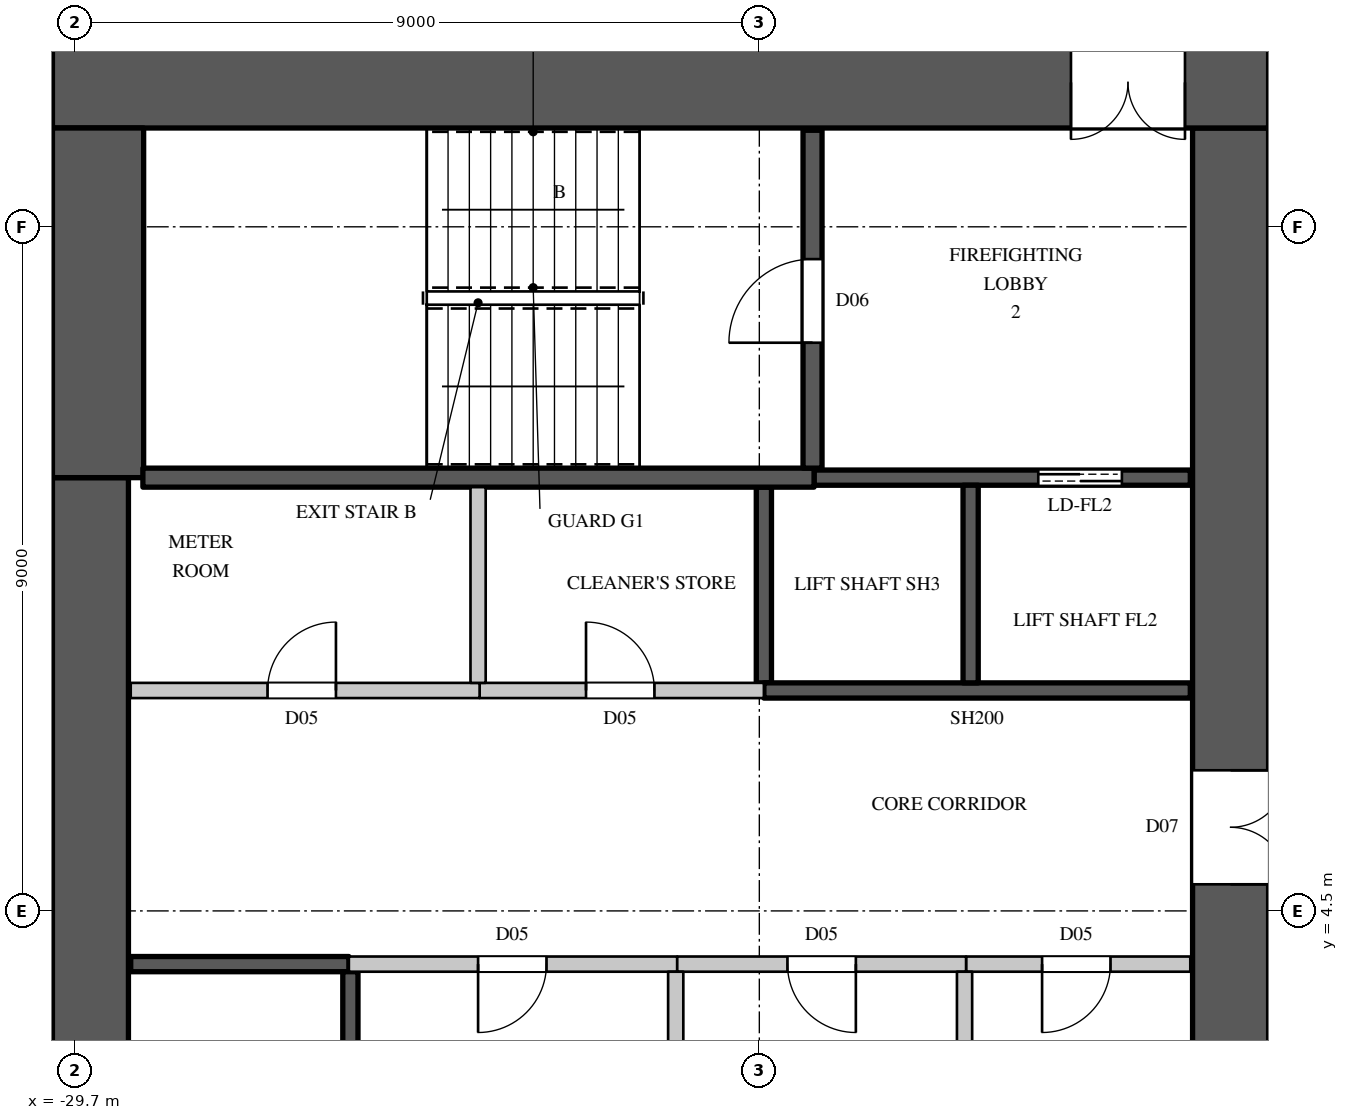
"""IFC4 building model, lengths in metres.
Left out: names, types, materials, properties, quantities, classifications, styles, units other than length and angle.
Written with IfcOpenShell. Run it as: python <this file> out.ifc"""

import sys

from ifc_helpers import new_model, si_unit, direction, frame, frame_2d, origin, place, context, subcontext, project, spatial, rectangle, extrude, element, fill, save


model = new_model("IFC4")
c1 = context("Model", 3, precision=1e-05, world=origin(), true_north=direction((0.0, 1.0)))
c2 = subcontext(c1, "Body", "Model", "MODEL_VIEW")
j1 = project(units=[si_unit("LENGTHUNIT", "METRE"), si_unit("PLANEANGLEUNIT", "RADIAN")], contexts=[c1])
p1 = place(None, origin())
s1 = spatial("IfcSite", under=j1, at=p1, CompositionType="ELEMENT")
p2 = place(p1, origin())
s2 = spatial("IfcBuilding", under=s1, at=p2, CompositionType="ELEMENT")
p3 = place(p2, frame((0.0, 0.0, 87.9)))
s3 = spatial("IfcBuildingStorey", under=s2, at=p3, CompositionType="ELEMENT", Elevation=87.9)
p4 = place(p3, frame((-30.0, 15.4, 0.0), z_axis=(0.0, 0.0, 1.0), x_axis=(1.0, 0.0, 0.0)))
e1 = element("IfcWall", 1, at=p4, inside=s3, PredefinedType="SHEAR", context=c2, shape_type="SweptSolid", body=[
    extrude(rectangle(XDim=16.0, YDim=1.2, at=frame_2d((8.0, 0.0))), origin(), (0.0, 0.0, 1.0), 3.6),
])
p5 = place(p4, frame((13.4, 0.0, 0.0)))
e2 = element("IfcOpeningElement", 2, at=p5, cuts=e1, PredefinedType="OPENING", context=c2, shape_type="SweptSolid", body=[
    extrude(rectangle(XDim=1.5, YDim=2.4, at=frame_2d((0.75, 1.2))), frame((0.0, 0.61, 0.0), z_axis=(0.0, -1.0, 0.0), x_axis=(1.0, 0.0, 0.0)), (0.0, 0.0, 1.0), 1.22),
])
p6 = place(p3, frame((-14.5, -14.8, 0.0), z_axis=(0.0, 0.0, 1.0), x_axis=(0.0, 1.0, 0.0)))
e3 = element("IfcWall", 3, at=p6, inside=s3, PredefinedType="SHEAR", context=c2, shape_type="SweptSolid", body=[
    extrude(rectangle(XDim=29.6, YDim=1.0, at=frame_2d((14.8, 0.0))), origin(), (0.0, 0.0, 1.0), 3.6),
])
p7 = place(p6, frame((8.45, 0.0, 0.0)))
e4 = element("IfcOpeningElement", 4, at=p7, cuts=e3, PredefinedType="OPENING", context=c2, shape_type="SweptSolid", body=[
    extrude(rectangle(XDim=1.5, YDim=2.4, at=frame_2d((0.75, 1.2))), frame((0.0, 0.51, 0.0), z_axis=(0.0, -1.0, 0.0), x_axis=(1.0, 0.0, 0.0)), (0.0, 0.0, 1.0), 1.02),
])
p8 = place(p6, frame((19.65, 0.0, 0.0)))
e5 = element("IfcOpeningElement", 5, at=p8, cuts=e3, PredefinedType="OPENING", context=c2, shape_type="SweptSolid", body=[
    extrude(rectangle(XDim=1.5, YDim=2.4, at=frame_2d((0.75, 1.2))), frame((0.0, 0.51, 0.0), z_axis=(0.0, -1.0, 0.0), x_axis=(1.0, 0.0, 0.0)), (0.0, 0.0, 1.0), 1.02),
])
p9 = place(p6, frame((14.5, 0.0, 0.0)))
e6 = element("IfcOpeningElement", 6, at=p9, cuts=e3, PredefinedType="OPENING", context=c2, shape_type="SweptSolid", body=[
    extrude(rectangle(XDim=0.6, YDim=2.0, at=frame_2d((0.3, 1.0))), frame((0.0, 0.51, 0.0), z_axis=(0.0, -1.0, 0.0), x_axis=(1.0, 0.0, 0.0)), (0.0, 0.0, 1.0), 1.02),
])
p10 = place(p3, frame((-29.5, -10.2, 0.0), z_axis=(0.0, 0.0, 1.0), x_axis=(0.0, 1.0, 0.0)))
e7 = element("IfcWall", 7, at=p10, inside=s3, PredefinedType="SHEAR", context=c2, shape_type="SweptSolid", body=[
    extrude(rectangle(XDim=20.4, YDim=1.0, at=frame_2d((10.2, 0.0))), origin(), (0.0, 0.0, 1.0), 3.6),
])
p11 = place(p3, frame((-29.4, 10.2, 0.0), z_axis=(0.0, 0.0, 1.0), x_axis=(0.0, 1.0, 0.0)))
e8 = element("IfcWall", 8, at=p11, inside=s3, PredefinedType="SHEAR", context=c2, shape_type="SweptSolid", body=[
    extrude(rectangle(XDim=4.6, YDim=1.2, at=frame_2d((2.3, 0.0))), origin(), (0.0, 0.0, 1.0), 3.6),
])
p12 = place(p3, frame((-26.1, 3.8, 0.0), z_axis=(0.0, 0.0, 1.0), x_axis=(1.0, 0.0, 0.0)))
e9 = element("IfcWall", 9, at=p12, inside=s3, PredefinedType="PARTITIONING", context=c2, shape_type="SweptSolid", body=[
    extrude(rectangle(XDim=4.32, YDim=0.2, at=frame_2d((2.16, 0.0))), origin(), (0.0, 0.0, 1.0), 3.3),
])
p13 = place(p12, frame((1.7, 0.0, 0.0)))
e10 = element("IfcOpeningElement", 10, at=p13, cuts=e9, PredefinedType="OPENING", context=c2, shape_type="SweptSolid", body=[
    extrude(rectangle(XDim=0.9, YDim=2.2, at=frame_2d((0.45, 1.1))), frame((0.0, 0.11, 0.0), z_axis=(0.0, -1.0, 0.0), x_axis=(1.0, 0.0, 0.0)), (0.0, 0.0, 1.0), 0.22),
])
p14 = place(p3, frame((-24.38, 7.4, 0.0), z_axis=(0.0, 0.0, 1.0), x_axis=(1.0, 0.0, 0.0)))
e11 = element("IfcWall", 11, at=p14, inside=s3, PredefinedType="PARTITIONING", context=c2, shape_type="SweptSolid", body=[
    extrude(rectangle(XDim=3.74, YDim=0.2, at=frame_2d((1.87, 0.0))), origin(), (0.0, 0.0, 1.0), 3.3),
])
p15 = place(p14, frame((1.4, 0.0, 0.0)))
e12 = element("IfcOpeningElement", 12, at=p15, cuts=e11, PredefinedType="OPENING", context=c2, shape_type="SweptSolid", body=[
    extrude(rectangle(XDim=0.9, YDim=2.2, at=frame_2d((0.45, 1.1))), frame((0.0, 0.11, 0.0), z_axis=(0.0, -1.0, 0.0), x_axis=(1.0, 0.0, 0.0)), (0.0, 0.0, 1.0), 0.22),
])
p16 = place(p3, frame((-17.98, 3.8, 0.0), z_axis=(0.0, 0.0, 1.0), x_axis=(1.0, 0.0, 0.0)))
e13 = element("IfcWall", 13, at=p16, inside=s3, PredefinedType="PARTITIONING", context=c2, shape_type="SweptSolid", body=[
    extrude(rectangle(XDim=2.95, YDim=0.2, at=frame_2d((1.475, 0.0))), origin(), (0.0, 0.0, 1.0), 3.3),
])
p17 = place(p16, frame((1.0, 0.0, 0.0)))
e14 = element("IfcOpeningElement", 14, at=p17, cuts=e13, PredefinedType="OPENING", context=c2, shape_type="SweptSolid", body=[
    extrude(rectangle(XDim=0.9, YDim=2.2, at=frame_2d((0.45, 1.1))), frame((0.0, 0.11, 0.0), z_axis=(0.0, -1.0, 0.0), x_axis=(1.0, 0.0, 0.0)), (0.0, 0.0, 1.0), 0.22),
])
p18 = place(p3, frame((-28.97, 7.4, 0.0), z_axis=(0.0, 0.0, 1.0), x_axis=(1.0, 0.0, 0.0)))
e15 = element("IfcWall", 15, at=p18, inside=s3, PredefinedType="PARTITIONING", context=c2, shape_type="SweptSolid", body=[
    extrude(rectangle(XDim=4.59, YDim=0.2, at=frame_2d((2.295, 0.0))), origin(), (0.0, 0.0, 1.0), 3.3),
])
p19 = place(p18, frame((1.8, 0.0, 0.0)))
e16 = element("IfcOpeningElement", 16, at=p19, cuts=e15, PredefinedType="OPENING", context=c2, shape_type="SweptSolid", body=[
    extrude(rectangle(XDim=0.9, YDim=2.2, at=frame_2d((0.45, 1.1))), frame((0.0, 0.11, 0.0), z_axis=(0.0, -1.0, 0.0), x_axis=(1.0, 0.0, 0.0)), (0.0, 0.0, 1.0), 0.22),
])
p20 = place(p3, frame((-24.4, 7.5, 0.0), z_axis=(0.0, 0.0, 1.0), x_axis=(0.0, 1.0, 0.0)))
e17 = element("IfcWall", 17, at=p20, inside=s3, PredefinedType="PARTITIONING", context=c2, shape_type="SweptSolid", body=[
    extrude(rectangle(XDim=2.575, YDim=0.2, at=frame_2d((1.288, 0.0))), origin(), (0.0, 0.0, 1.0), 3.3),
])
p21 = place(p3, frame((-21.78, 3.8, 0.0), z_axis=(0.0, 0.0, 1.0), x_axis=(1.0, 0.0, 0.0)))
e18 = element("IfcWall", 18, at=p21, inside=s3, PredefinedType="PARTITIONING", context=c2, shape_type="SweptSolid", body=[
    extrude(rectangle(XDim=3.8, YDim=0.2, at=frame_2d((1.9, 0.0))), origin(), (0.0, 0.0, 1.0), 3.3),
])
p22 = place(p21, frame((1.45, 0.0, 0.0)))
e19 = element("IfcOpeningElement", 19, at=p22, cuts=e18, PredefinedType="OPENING", context=c2, shape_type="SweptSolid", body=[
    extrude(rectangle(XDim=0.9, YDim=2.2, at=frame_2d((0.45, 1.1))), frame((0.0, 0.11, 0.0), z_axis=(0.0, -1.0, 0.0), x_axis=(1.0, 0.0, 0.0)), (0.0, 0.0, 1.0), 0.22),
])
for number, where, z_axis, x_axis in (
    (20, (-21.8, 1.1, 0.0), (0.0, 0.0, 1.0), (0.0, 1.0, 0.0)),
    (21, (-18.0, 1.1, 0.0), (0.0, 0.0, 1.0), (0.0, 1.0, 0.0)),
):
    element("IfcWall", number, at=place(p3, frame(where, z_axis=z_axis, x_axis=x_axis)), inside=s3, PredefinedType="PARTITIONING", context=c2, shape_type="SweptSolid", body=[
        extrude(rectangle(XDim=2.6, YDim=0.2, at=frame_2d((1.3, 0.0))), origin(), (0.0, 0.0, 1.0), 3.3),
    ])
p23 = place(p3, frame((-28.97, 3.8, 0.0), z_axis=(0.0, 0.0, 1.0), x_axis=(1.0, 0.0, 0.0)))
e22 = element("IfcWall", 22, at=p23, inside=s3, PredefinedType="SHEAR", context=c2, shape_type="SweptSolid", body=[
    extrude(rectangle(XDim=2.87, YDim=0.2, at=frame_2d((1.435, 0.0))), origin(), (0.0, 0.0, 1.0), 3.3),
])
p24 = place(p3, frame((-26.08, 1.1, 0.0), z_axis=(0.0, 0.0, 1.0), x_axis=(0.0, 1.0, 0.0)))
e23 = element("IfcWall", 23, at=p24, inside=s3, PredefinedType="SHEAR", context=c2, shape_type="SweptSolid", body=[
    extrude(rectangle(XDim=2.6, YDim=0.2, at=frame_2d((1.3, 0.0))), origin(), (0.0, 0.0, 1.0), 3.3),
])
p25 = place(p3, frame((-20.64, 7.5, 0.0), z_axis=(0.0, 0.0, 1.0), x_axis=(0.0, 1.0, 0.0)))
e24 = element("IfcWall", 24, at=p25, inside=s3, PredefinedType="SHEAR", context=c2, shape_type="SweptSolid", body=[
    extrude(rectangle(XDim=2.575, YDim=0.2, at=frame_2d((1.288, 0.0))), origin(), (0.0, 0.0, 1.0), 3.3),
])
p26 = place(p3, frame((-20.64, 7.4, 0.0), z_axis=(0.0, 0.0, 1.0), x_axis=(1.0, 0.0, 0.0)))
e25 = element("IfcWall", 25, at=p26, inside=s3, PredefinedType="SHEAR", context=c2, shape_type="SweptSolid", body=[
    extrude(rectangle(XDim=5.61, YDim=0.2, at=frame_2d((2.805, 0.0))), origin(), (0.0, 0.0, 1.0), 3.3),
])
p27 = place(p3, frame((-19.98, 10.2, 0.0), z_axis=(0.0, 0.0, 1.0), x_axis=(1.0, 0.0, 0.0)))
e26 = element("IfcWall", 26, at=p27, inside=s3, PredefinedType="SHEAR", context=c2, shape_type="SweptSolid", body=[
    extrude(rectangle(XDim=4.95, YDim=0.2, at=frame_2d((2.475, 0.0))), origin(), (0.0, 0.0, 1.0), 3.3),
])
p28 = place(p27, frame((2.95, 0.0, 0.0)))
e27 = element("IfcOpeningElement", 27, at=p28, cuts=e26, PredefinedType="OPENING", context=c2, shape_type="SweptSolid", body=[
    extrude(rectangle(XDim=1.1, YDim=2.2, at=frame_2d((0.55, 1.1))), frame((0.0, 0.11, 0.0), z_axis=(0.0, -1.0, 0.0), x_axis=(1.0, 0.0, 0.0)), (0.0, 0.0, 1.0), 0.22),
])
p29 = place(p3, frame((-17.92, 7.5, 0.0), z_axis=(0.0, 0.0, 1.0), x_axis=(0.0, 1.0, 0.0)))
e28 = element("IfcWall", 28, at=p29, inside=s3, PredefinedType="SHEAR", context=c2, shape_type="SweptSolid", body=[
    extrude(rectangle(XDim=2.6, YDim=0.2, at=frame_2d((1.3, 0.0))), origin(), (0.0, 0.0, 1.0), 3.6),
])
p30 = place(p3, frame((-28.81, 10.2, 0.0), z_axis=(0.0, 0.0, 1.0), x_axis=(1.0, 0.0, 0.0)))
e29 = element("IfcWall", 29, at=p30, inside=s3, PredefinedType="SHEAR", context=c2, shape_type="SweptSolid", body=[
    extrude(rectangle(XDim=8.83, YDim=0.25, at=frame_2d((4.415, 0.0))), origin(), (0.0, 0.0, 1.0), 3.3),
])
p31 = place(p3, frame((-20.0, 10.325, 0.0), z_axis=(0.0, 0.0, 1.0), x_axis=(0.0, 1.0, 0.0)))
e30 = element("IfcWall", 30, at=p31, inside=s3, PredefinedType="SHEAR", context=c2, shape_type="SweptSolid", body=[
    extrude(rectangle(XDim=4.445, YDim=0.25, at=frame_2d((2.223, 0.0))), origin(), (0.0, 0.0, 1.0), 3.3),
])
p32 = place(p31, frame((1.65, 0.0, 0.0)))
e31 = element("IfcOpeningElement", 31, at=p32, cuts=e30, PredefinedType="OPENING", context=c2, shape_type="SweptSolid", body=[
    extrude(rectangle(XDim=1.1, YDim=2.2, at=frame_2d((0.55, 1.1))), frame((0.0, 0.135, 0.0), z_axis=(0.0, -1.0, 0.0), x_axis=(1.0, 0.0, 0.0)), (0.0, 0.0, 1.0), 0.27),
])
p33 = place(p32, origin())
e32 = element("IfcDoor", 32, at=p33, inside=s3, OperationType="SINGLE_SWING_LEFT", PredefinedType="DOOR", context=c2, shape_type="SweptSolid", body=[
    extrude(rectangle(XDim=1.1, YDim=2.2, at=frame_2d((0.55, 1.1))), frame((0.0, 0.025, 0.0), z_axis=(0.0, -1.0, 0.0), x_axis=(1.0, 0.0, 0.0)), (0.0, 0.0, 1.0), 0.05),
])
fill(e31, e32)
p34 = place(p13, origin())
e33 = element("IfcDoor", 33, at=p34, inside=s3, OperationType="SINGLE_SWING_RIGHT", PredefinedType="DOOR", context=c2, shape_type="SweptSolid", body=[
    extrude(rectangle(XDim=0.9, YDim=2.2, at=frame_2d((0.45, 1.1))), frame((0.0, 0.025, 0.0), z_axis=(0.0, -1.0, 0.0), x_axis=(1.0, 0.0, 0.0)), (0.0, 0.0, 1.0), 0.05),
])
fill(e10, e33)
p35 = place(p22, origin())
e34 = element("IfcDoor", 34, at=p35, inside=s3, OperationType="SINGLE_SWING_LEFT", PredefinedType="DOOR", context=c2, shape_type="SweptSolid", body=[
    extrude(rectangle(XDim=0.9, YDim=2.2, at=frame_2d((0.45, 1.1))), frame((0.0, 0.025, 0.0), z_axis=(0.0, -1.0, 0.0), x_axis=(1.0, 0.0, 0.0)), (0.0, 0.0, 1.0), 0.05),
])
fill(e19, e34)
p36 = place(p17, origin())
e35 = element("IfcDoor", 35, at=p36, inside=s3, OperationType="SINGLE_SWING_RIGHT", PredefinedType="DOOR", context=c2, shape_type="SweptSolid", body=[
    extrude(rectangle(XDim=0.9, YDim=2.2, at=frame_2d((0.45, 1.1))), frame((0.0, 0.025, 0.0), z_axis=(0.0, -1.0, 0.0), x_axis=(1.0, 0.0, 0.0)), (0.0, 0.0, 1.0), 0.05),
])
fill(e14, e35)
p37 = place(p19, origin())
e36 = element("IfcDoor", 36, at=p37, inside=s3, OperationType="SINGLE_SWING_RIGHT", PredefinedType="DOOR", context=c2, shape_type="SweptSolid", body=[
    extrude(rectangle(XDim=0.9, YDim=2.2, at=frame_2d((0.45, 1.1))), frame((0.0, 0.025, 0.0), z_axis=(0.0, -1.0, 0.0), x_axis=(1.0, 0.0, 0.0)), (0.0, 0.0, 1.0), 0.05),
])
fill(e16, e36)
p38 = place(p15, origin())
e37 = element("IfcDoor", 37, at=p38, inside=s3, OperationType="SINGLE_SWING_LEFT", PredefinedType="DOOR", context=c2, shape_type="SweptSolid", body=[
    extrude(rectangle(XDim=0.9, YDim=2.2, at=frame_2d((0.45, 1.1))), frame((0.0, 0.025, 0.0), z_axis=(0.0, -1.0, 0.0), x_axis=(1.0, 0.0, 0.0)), (0.0, 0.0, 1.0), 0.05),
])
fill(e12, e37)
p39 = place(p28, origin())
e38 = element("IfcDoor", 38, at=p39, inside=s3, OperationType="DOUBLE_DOOR_SLIDING", PredefinedType="DOOR", context=c2, shape_type="SweptSolid", body=[
    extrude(rectangle(XDim=1.1, YDim=2.2, at=frame_2d((0.55, 1.1))), frame((0.0, 0.025, 0.0), z_axis=(0.0, -1.0, 0.0), x_axis=(1.0, 0.0, 0.0)), (0.0, 0.0, 1.0), 0.05),
])
fill(e27, e38)
p40 = place(p5, origin())
e39 = element("IfcDoor", 39, at=p40, inside=s3, OperationType="DOUBLE_DOOR_SINGLE_SWING", PredefinedType="DOOR", context=c2, shape_type="SweptSolid", body=[
    extrude(rectangle(XDim=1.5, YDim=2.4, at=frame_2d((0.75, 1.2))), frame((0.0, 0.025, 0.0), z_axis=(0.0, -1.0, 0.0), x_axis=(1.0, 0.0, 0.0)), (0.0, 0.0, 1.0), 0.05),
])
fill(e2, e39)
p41 = place(p8, origin())
e40 = element("IfcDoor", 40, at=p41, inside=s3, OperationType="DOUBLE_DOOR_SINGLE_SWING", PredefinedType="DOOR", context=c2, shape_type="SweptSolid", body=[
    extrude(rectangle(XDim=1.5, YDim=2.4, at=frame_2d((0.75, 1.2))), frame((0.0, -0.445, 0.0), z_axis=(0.0, -1.0, 0.0), x_axis=(1.0, 0.0, 0.0)), (0.0, 0.0, 1.0), 0.05),
])
fill(e5, e40)
save(model, sys.argv[1])
